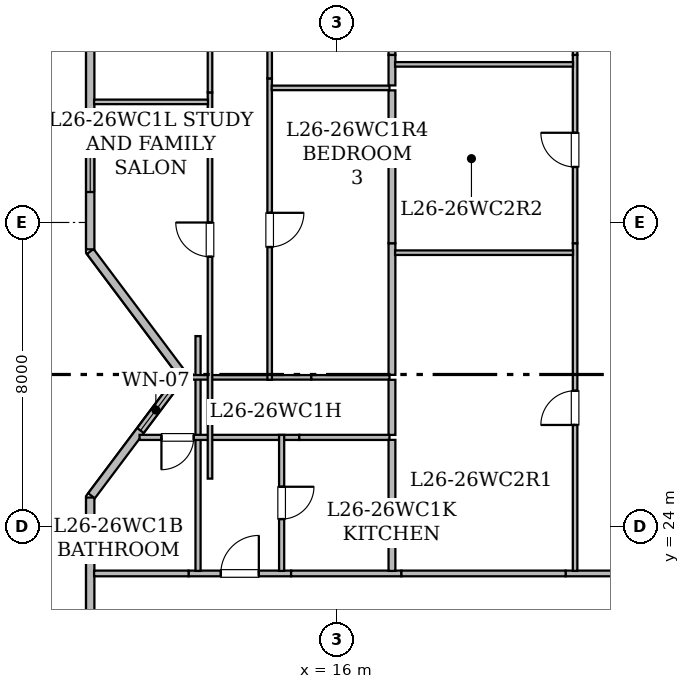
"""IFC4 building model, lengths in metres.
Left out: names, types, materials, properties, quantities, classifications, styles, units other than length and angle.
Written with IfcOpenShell. Run it as: python <this file> out.ifc"""

import sys

from ifc_helpers import new_model, si_unit, direction, frame, frame_2d, origin, place, context, subcontext, project, spatial, rectangle, extrude, element, fill, save


model = new_model("IFC4")
c1 = context("Model", 3, precision=1e-05, world=origin(), true_north=direction((0.0, 1.0)))
c2 = subcontext(c1, "Body", "Model", "MODEL_VIEW")
j1 = project(units=[si_unit("LENGTHUNIT", "METRE"), si_unit("PLANEANGLEUNIT", "RADIAN")], contexts=[c1])
p1 = place(None, origin())
s1 = spatial("IfcSite", under=j1, at=p1, CompositionType="ELEMENT")
p2 = place(p1, origin())
s2 = spatial("IfcBuilding", under=s1, at=p2, CompositionType="ELEMENT")
p3 = place(p2, frame((0.0, 0.0, 105.55)))
s3 = spatial("IfcBuildingStorey", under=s2, at=p3, CompositionType="ELEMENT", Elevation=105.55)
p4 = place(p3, frame((9.51, 10.717, 0.0), z_axis=(0.0, 0.0, 1.0), x_axis=(0.0, 1.0, 0.0)))
e1 = element("IfcWall", 1, at=p4, inside=s3, PredefinedType="STANDARD", context=c2, shape_type="SweptSolid", body=[
    extrude(rectangle(XDim=14.046, YDim=0.22, at=frame_2d((7.023, 0.0))), origin(), (0.0, 0.0, 1.0), 3.43),
])
p5 = place(p4, frame((5.744, 0.0, 0.8)))
e2 = element("IfcOpeningElement", 2, at=p5, cuts=e1, PredefinedType="OPENING", context=c2, shape_type="SweptSolid", body=[
    extrude(rectangle(XDim=1.2, YDim=1.5, at=frame_2d((0.6, 0.75))), frame((0.0, 0.12, 0.0), z_axis=(0.0, -1.0, 0.0), x_axis=(1.0, 0.0, 0.0)), (0.0, 0.0, 1.0), 0.24),
])
p6 = place(p4, frame((2.345, 0.0, 0.85)))
e3 = element("IfcOpeningElement", 3, at=p6, cuts=e1, PredefinedType="OPENING", context=c2, shape_type="SweptSolid", body=[
    extrude(rectangle(XDim=1.65, YDim=1.55, at=frame_2d((0.825, 0.775))), frame((0.0, 0.12, 0.0), z_axis=(0.0, -1.0, 0.0), x_axis=(1.0, 0.0, 0.0)), (0.0, 0.0, 1.0), 0.24),
])
p7 = place(p3, frame((9.544, 24.808, 0.0), z_axis=(0.0, 0.0, 1.0), x_axis=(0.600019580308, 0.799985314394, 0.0)))
e4 = element("IfcWall", 4, at=p7, inside=s3, PredefinedType="STANDARD", context=c2, shape_type="SweptSolid", body=[
    extrude(rectangle(XDim=3.99, YDim=0.22, at=frame_2d((1.995, 0.0))), origin(), (0.0, 0.0, 1.0), 3.43),
])
p8 = place(p7, frame((2.147, 0.0, 0.85)))
e5 = element("IfcOpeningElement", 5, at=p8, cuts=e4, PredefinedType="OPENING", context=c2, shape_type="SweptSolid", body=[
    extrude(rectangle(XDim=1.35, YDim=1.5, at=frame_2d((0.675, 0.75))), frame((0.0, 0.12, 0.0), z_axis=(0.0, -1.0, 0.0), x_axis=(1.0, 0.0, 0.0)), (0.0, 0.0, 1.0), 0.24),
])
p9 = place(p3, frame((11.881, 28.077, 0.0), z_axis=(0.0, 0.0, 1.0), x_axis=(-0.600158184825, 0.799881336942, 0.0)))
e6 = element("IfcWall", 6, at=p9, inside=s3, PredefinedType="STANDARD", context=c2, shape_type="SweptSolid", body=[
    extrude(rectangle(XDim=3.951, YDim=0.22, at=frame_2d((1.975, 0.0))), origin(), (0.0, 0.0, 1.0), 3.43),
])
p10 = place(p3, frame((9.51, 31.293, 0.0), z_axis=(0.0, 0.0, 1.0), x_axis=(0.0, 1.0, 0.0)))
e7 = element("IfcWall", 7, at=p10, inside=s3, PredefinedType="STANDARD", context=c2, shape_type="SweptSolid", body=[
    extrude(rectangle(XDim=14.061, YDim=0.22, at=frame_2d((7.031, 0.0))), origin(), (0.0, 0.0, 1.0), 3.43),
])
p11 = place(p10, frame((1.508, 0.0, 0.85)))
e8 = element("IfcOpeningElement", 8, at=p11, cuts=e7, PredefinedType="OPENING", context=c2, shape_type="SweptSolid", body=[
    extrude(rectangle(XDim=1.65, YDim=1.55, at=frame_2d((0.825, 0.775))), frame((0.0, 0.12, 0.0), z_axis=(0.0, -1.0, 0.0), x_axis=(1.0, 0.0, 0.0)), (0.0, 0.0, 1.0), 0.24),
])
p12 = place(p10, frame((7.195, 0.0, 0.85)))
e9 = element("IfcOpeningElement", 9, at=p12, cuts=e7, PredefinedType="OPENING", context=c2, shape_type="SweptSolid", body=[
    extrude(rectangle(XDim=1.65, YDim=1.55, at=frame_2d((0.825, 0.775))), frame((0.0, 0.12, 0.0), z_axis=(0.0, -1.0, 0.0), x_axis=(1.0, 0.0, 0.0)), (0.0, 0.0, 1.0), 0.24),
])
p13 = place(p10, frame((12.543, 0.0, 0.85)))
e10 = element("IfcOpeningElement", 10, at=p13, cuts=e7, PredefinedType="OPENING", context=c2, shape_type="SweptSolid", body=[
    extrude(rectangle(XDim=1.35, YDim=1.5, at=frame_2d((0.675, 0.75))), frame((0.0, 0.12, 0.0), z_axis=(0.0, -1.0, 0.0), x_axis=(1.0, 0.0, 0.0)), (0.0, 0.0, 1.0), 0.24),
])
p14 = place(p3, frame((12.098, 22.765, 0.0), z_axis=(0.0, 0.0, 1.0), x_axis=(1.0, 0.0, 0.0)))
e11 = element("IfcWall", 11, at=p14, inside=s3, PredefinedType="STANDARD", context=c2, shape_type="SweptSolid", body=[
    extrude(rectangle(XDim=2.698, YDim=0.15, at=frame_2d((1.349, 0.0))), origin(), (0.0, 0.0, 1.0), 2.876),
])
p15 = place(p14, frame((0.849, 0.0, 0.0)))
e12 = element("IfcOpeningElement", 12, at=p15, cuts=e11, PredefinedType="OPENING", context=c2, shape_type="SweptSolid", body=[
    extrude(rectangle(XDim=1.0, YDim=2.15, at=frame_2d((0.5, 1.075))), frame((0.0, 0.085, 0.0), z_axis=(0.0, -1.0, 0.0), x_axis=(1.0, 0.0, 0.0)), (0.0, 0.0, 1.0), 0.17),
])
p16 = place(p3, frame((9.612, 22.765, 0.0), z_axis=(0.0, 0.0, 1.0), x_axis=(1.0, 0.0, 0.0)))
e13 = element("IfcWall", 13, at=p16, inside=s3, PredefinedType="STANDARD", context=c2, shape_type="SweptSolid", body=[
    extrude(rectangle(XDim=2.486, YDim=0.15, at=frame_2d((1.243, 0.0))), origin(), (0.0, 0.0, 1.0), 2.876),
])
p17 = place(p3, frame((14.796, 22.765, 0.0), z_axis=(0.0, 0.0, 1.0), x_axis=(1.0, 0.0, 0.0)))
e14 = element("IfcWall", 14, at=p17, inside=s3, PredefinedType="STANDARD", context=c2, shape_type="SweptSolid", body=[
    extrude(rectangle(XDim=2.903, YDim=0.15, at=frame_2d((1.452, 0.0))), origin(), (0.0, 0.0, 1.0), 3.43),
])
p18 = place(p3, frame((22.02, 22.765, 0.0), z_axis=(0.0, 0.0, 1.0), x_axis=(1.0, 0.0, 0.0)))
e15 = element("IfcWall", 15, at=p18, inside=s3, PredefinedType="STANDARD", context=c2, shape_type="SweptSolid", body=[
    extrude(rectangle(XDim=2.078, YDim=0.15, at=frame_2d((1.039, 0.0))), origin(), (0.0, 0.0, 1.0), 3.43),
])
p19 = place(p3, frame((17.699, 22.765, 0.0), z_axis=(0.0, 0.0, 1.0), x_axis=(1.0, 0.0, 0.0)))
e16 = element("IfcWall", 16, at=p19, inside=s3, PredefinedType="STANDARD", context=c2, shape_type="SweptSolid", body=[
    extrude(rectangle(XDim=4.321, YDim=0.15, at=frame_2d((2.161, 0.0))), origin(), (0.0, 0.0, 1.0), 2.647),
])
p20 = place(p3, frame((12.347, 22.832, 0.0), z_axis=(0.0, 0.0, 1.0), x_axis=(0.0, 1.0, 0.0)))
e17 = element("IfcWall", 17, at=p20, inside=s3, PredefinedType="PARTITIONING", context=c2, shape_type="SweptSolid", body=[
    extrude(rectangle(XDim=6.178, YDim=0.135, at=frame_2d((3.089, 0.0))), origin(), (0.0, 0.0, 1.0), 2.876),
])
p21 = place(p3, frame((15.012, 26.345, 0.0), z_axis=(0.0, 0.0, 1.0), x_axis=(-1.0, 0.0, 0.0)))
e18 = element("IfcWall", 18, at=p21, inside=s3, PredefinedType="PARTITIONING", context=c2, shape_type="SweptSolid", body=[
    extrude(rectangle(XDim=4.204, YDim=0.135, at=frame_2d((2.102, 0.0))), origin(), (0.0, 0.0, 1.0), 2.876),
])
p22 = place(p21, frame((2.778, 0.0, 0.0)))
e19 = element("IfcOpeningElement", 19, at=p22, cuts=e18, PredefinedType="OPENING", context=c2, shape_type="SweptSolid", body=[
    extrude(rectangle(XDim=0.85, YDim=2.1, at=frame_2d((0.425, 1.05))), frame((0.0, 0.077, 0.0), z_axis=(0.0, -1.0, 0.0), x_axis=(1.0, 0.0, 0.0)), (0.0, 0.0, 1.0), 0.155),
])
p23 = place(p3, frame((17.385, 26.345, 0.0), z_axis=(0.0, 0.0, 1.0), x_axis=(-1.0, 0.0, 0.0)))
e20 = element("IfcWall", 20, at=p23, inside=s3, PredefinedType="PARTITIONING", context=c2, shape_type="SweptSolid", body=[
    extrude(rectangle(XDim=2.373, YDim=0.135, at=frame_2d((1.187, 0.0))), origin(), (0.0, 0.0, 1.0), 3.43),
])
p24 = place(p3, frame((14.547, 26.41, 0.0), z_axis=(0.0, 0.0, 1.0), x_axis=(0.0, -1.0, 0.0)))
e21 = element("IfcWall", 21, at=p24, inside=s3, PredefinedType="PARTITIONING", context=c2, shape_type="SweptSolid", body=[
    extrude(rectangle(XDim=3.578, YDim=0.135, at=frame_2d((1.789, 0.0))), origin(), (0.0, 0.0, 1.0), 3.43),
])
p25 = place(p24, frame((1.364, 0.0, 0.0)))
e22 = element("IfcOpeningElement", 22, at=p25, cuts=e21, PredefinedType="OPENING", context=c2, shape_type="SweptSolid", body=[
    extrude(rectangle(XDim=0.85, YDim=2.1, at=frame_2d((0.425, 1.05))), frame((0.0, 0.077, 0.0), z_axis=(0.0, -1.0, 0.0), x_axis=(1.0, 0.0, 0.0)), (0.0, 0.0, 1.0), 0.155),
])
p26 = place(p3, frame((11.894, 27.925, 0.0), z_axis=(0.0, 0.0, 1.0), x_axis=(1.0, 0.0, 0.0)))
e23 = element("IfcWall", 23, at=p26, inside=s3, PredefinedType="PARTITIONING", context=c2, shape_type="SweptSolid", body=[
    extrude(rectangle(XDim=3.433, YDim=0.12, at=frame_2d((1.716, 0.0))), origin(), (0.0, 0.0, 1.0), 2.876),
])
p27 = place(p3, frame((12.662, 25.26, 0.0), z_axis=(0.0, 0.0, 1.0), x_axis=(0.0, 1.0, 0.0)))
e24 = element("IfcWall", 24, at=p27, inside=s3, PredefinedType="PARTITIONING", context=c2, shape_type="SweptSolid", body=[
    extrude(rectangle(XDim=10.162, YDim=0.12, at=frame_2d((5.081, 0.0))), origin(), (0.0, 0.0, 1.0), 3.43),
])
p28 = place(p27, frame((5.839, 0.0, 0.0)))
e25 = element("IfcOpeningElement", 25, at=p28, cuts=e24, PredefinedType="OPENING", context=c2, shape_type="SweptSolid", body=[
    extrude(rectangle(XDim=0.9, YDim=2.1, at=frame_2d((0.45, 1.05))), frame((0.0, 0.07, 0.0), z_axis=(0.0, -1.0, 0.0), x_axis=(1.0, 0.0, 0.0)), (0.0, 0.0, 1.0), 0.14),
])
p29 = place(p3, frame((12.662, 35.422, 0.0), z_axis=(0.0, 0.0, 1.0), x_axis=(0.0, 1.0, 0.0)))
e26 = element("IfcWall", 26, at=p29, inside=s3, PredefinedType="PARTITIONING", context=c2, shape_type="SweptSolid", body=[
    extrude(rectangle(XDim=8.281, YDim=0.12, at=frame_2d((4.14, 0.0))), origin(), (0.0, 0.0, 1.0), 2.647),
])
p30 = place(p29, frame((3.67, 0.0, 0.0)))
e27 = element("IfcOpeningElement", 27, at=p30, cuts=e26, PredefinedType="OPENING", context=c2, shape_type="SweptSolid", body=[
    extrude(rectangle(XDim=0.9, YDim=2.1, at=frame_2d((0.45, 1.05))), frame((0.0, 0.07, 0.0), z_axis=(0.0, -1.0, 0.0), x_axis=(1.0, 0.0, 0.0)), (0.0, 0.0, 1.0), 0.14),
])
p31 = place(p3, frame((15.327, 27.925, 0.0), z_axis=(0.0, 0.0, 1.0), x_axis=(1.0, 0.0, 0.0)))
e28 = element("IfcWall", 28, at=p31, inside=s3, PredefinedType="PARTITIONING", context=c2, shape_type="SweptSolid", body=[
    extrude(rectangle(XDim=2.058, YDim=0.12, at=frame_2d((1.029, 0.0))), origin(), (0.0, 0.0, 1.0), 3.43),
])
p32 = place(p3, frame((14.232, 35.79, 0.0), z_axis=(0.0, 0.0, 1.0), x_axis=(0.0, -1.0, 0.0)))
e29 = element("IfcWall", 29, at=p32, inside=s3, PredefinedType="PARTITIONING", context=c2, shape_type="SweptSolid", body=[
    extrude(rectangle(XDim=7.93, YDim=0.12, at=frame_2d((3.965, 0.0))), origin(), (0.0, 0.0, 1.0), 3.43),
])
p33 = place(p32, frame((3.536, 0.0, 0.0)))
e30 = element("IfcOpeningElement", 30, at=p33, cuts=e29, PredefinedType="OPENING", context=c2, shape_type="SweptSolid", body=[
    extrude(rectangle(XDim=0.9, YDim=2.1, at=frame_2d((0.45, 1.05))), frame((0.0, 0.07, 0.0), z_axis=(0.0, -1.0, 0.0), x_axis=(1.0, 0.0, 0.0)), (0.0, 0.0, 1.0), 0.14),
])
p34 = place(p3, frame((14.232, 44.495, 0.0), z_axis=(0.0, 0.0, 1.0), x_axis=(0.0, -1.0, 0.0)))
e31 = element("IfcWall", 31, at=p34, inside=s3, PredefinedType="PARTITIONING", context=c2, shape_type="SweptSolid", body=[
    extrude(rectangle(XDim=8.705, YDim=0.12, at=frame_2d((4.353, 0.0))), origin(), (0.0, 0.0, 1.0), 2.647),
])
p35 = place(p34, frame((3.923, 0.0, 0.0)))
e32 = element("IfcOpeningElement", 32, at=p35, cuts=e31, PredefinedType="OPENING", context=c2, shape_type="SweptSolid", body=[
    extrude(rectangle(XDim=0.9, YDim=2.1, at=frame_2d((0.45, 1.05))), frame((0.0, 0.07, 0.0), z_axis=(0.0, -1.0, 0.0), x_axis=(1.0, 0.0, 0.0)), (0.0, 0.0, 1.0), 0.14),
])
p36 = place(p3, frame((17.45, 27.86, 0.0), z_axis=(0.0, 0.0, 1.0), x_axis=(0.0, -1.0, 0.0)))
e33 = element("IfcWall", 33, at=p36, inside=s3, PredefinedType="STANDARD", context=c2, shape_type="SweptSolid", body=[
    extrude(rectangle(XDim=1.45, YDim=0.18, at=frame_2d((0.725, 0.0))), origin(), (0.0, 0.0, 1.0), 3.43),
])
p37 = place(p3, frame((17.45, 26.28, 0.0), z_axis=(0.0, 0.0, 1.0), x_axis=(0.0, -1.0, 0.0)))
e34 = element("IfcWall", 34, at=p37, inside=s3, PredefinedType="STANDARD", context=c2, shape_type="SweptSolid", body=[
    extrude(rectangle(XDim=3.448, YDim=0.18, at=frame_2d((1.724, 0.0))), origin(), (0.0, 0.0, 1.0), 3.43),
])
p38 = place(p3, frame((9.612, 35.173, 0.0), z_axis=(0.0, 0.0, 1.0), x_axis=(1.0, 0.0, 0.0)))
e35 = element("IfcWall", 35, at=p38, inside=s3, PredefinedType="PARTITIONING", context=c2, shape_type="SweptSolid", body=[
    extrude(rectangle(XDim=2.996, YDim=0.12, at=frame_2d((1.498, 0.0))), origin(), (0.0, 0.0, 1.0), 2.876),
])
p39 = place(p3, frame((14.286, 35.541, 0.0), z_axis=(0.0, 0.0, 1.0), x_axis=(1.0, 0.0, 0.0)))
e36 = element("IfcWall", 36, at=p39, inside=s3, PredefinedType="PARTITIONING", context=c2, shape_type="SweptSolid", body=[
    extrude(rectangle(XDim=3.099, YDim=0.12, at=frame_2d((1.55, 0.0))), origin(), (0.0, 0.0, 1.0), 3.43),
])
p40 = place(p3, frame((17.45, 31.454, 0.0), z_axis=(0.0, 0.0, 1.0), x_axis=(0.0, -1.0, 0.0)))
e37 = element("IfcWall", 37, at=p40, inside=s3, PredefinedType="STANDARD", context=c2, shape_type="SweptSolid", body=[
    extrude(rectangle(XDim=3.464, YDim=0.18, at=frame_2d((1.732, 0.0))), origin(), (0.0, 0.0, 1.0), 3.43),
])
p41 = place(p3, frame((17.45, 35.476, 0.0), z_axis=(0.0, 0.0, 1.0), x_axis=(0.0, -1.0, 0.0)))
e38 = element("IfcWall", 38, at=p41, inside=s3, PredefinedType="STANDARD", context=c2, shape_type="SweptSolid", body=[
    extrude(rectangle(XDim=4.022, YDim=0.18, at=frame_2d((2.011, 0.0))), origin(), (0.0, 0.0, 1.0), 3.43),
])
p42 = place(p3, frame((17.45, 36.409, 0.0), z_axis=(0.0, 0.0, 1.0), x_axis=(0.0, -1.0, 0.0)))
e39 = element("IfcWall", 39, at=p42, inside=s3, PredefinedType="STANDARD", context=c2, shape_type="SweptSolid", body=[
    extrude(rectangle(XDim=0.803, YDim=0.18, at=frame_2d((0.401, 0.0))), origin(), (0.0, 0.0, 1.0), 3.43),
])
p43 = place(p3, frame((17.45, 42.504, 0.0), z_axis=(0.0, 0.0, 1.0), x_axis=(0.0, -1.0, 0.0)))
e40 = element("IfcWall", 40, at=p43, inside=s3, PredefinedType="STANDARD", context=c2, shape_type="SweptSolid", body=[
    extrude(rectangle(XDim=6.095, YDim=0.18, at=frame_2d((3.047, 0.0))), origin(), (0.0, 0.0, 1.0), 2.647),
])
p44 = place(p3, frame((22.269, 22.832, 0.0), z_axis=(0.0, 0.0, 1.0), x_axis=(0.0, 1.0, 0.0)))
e41 = element("IfcWall", 41, at=p44, inside=s3, PredefinedType="PARTITIONING", context=c2, shape_type="SweptSolid", body=[
    extrude(rectangle(XDim=8.622, YDim=0.12, at=frame_2d((4.311, 0.0))), origin(), (0.0, 0.0, 1.0), 2.961),
])
p45 = place(p44, frame((3.84, 0.0, 0.0)))
e42 = element("IfcOpeningElement", 42, at=p45, cuts=e41, PredefinedType="OPENING", context=c2, shape_type="SweptSolid", body=[
    extrude(rectangle(XDim=0.9, YDim=2.1, at=frame_2d((0.45, 1.05))), frame((0.0, 0.07, 0.0), z_axis=(0.0, -1.0, 0.0), x_axis=(1.0, 0.0, 0.0)), (0.0, 0.0, 1.0), 0.14),
])
p46 = place(p3, frame((22.269, 31.454, 0.0), z_axis=(0.0, 0.0, 1.0), x_axis=(0.0, 1.0, 0.0)))
e43 = element("IfcWall", 43, at=p46, inside=s3, PredefinedType="PARTITIONING", context=c2, shape_type="SweptSolid", body=[
    extrude(rectangle(XDim=4.955, YDim=0.12, at=frame_2d((2.478, 0.0))), origin(), (0.0, 0.0, 1.0), 3.43),
])
p47 = place(p46, frame((2.006, 0.0, 0.0)))
e44 = element("IfcOpeningElement", 44, at=p47, cuts=e43, PredefinedType="OPENING", context=c2, shape_type="SweptSolid", body=[
    extrude(rectangle(XDim=0.9, YDim=2.1, at=frame_2d((0.45, 1.05))), frame((0.0, 0.07, 0.0), z_axis=(0.0, -1.0, 0.0), x_axis=(1.0, 0.0, 0.0)), (0.0, 0.0, 1.0), 0.14),
])
p48 = place(p3, frame((22.269, 36.409, 0.0), z_axis=(0.0, 0.0, 1.0), x_axis=(0.0, 1.0, 0.0)))
e45 = element("IfcWall", 45, at=p48, inside=s3, PredefinedType="PARTITIONING", context=c2, shape_type="SweptSolid", body=[
    extrude(rectangle(XDim=6.095, YDim=0.12, at=frame_2d((3.047, 0.0))), origin(), (0.0, 0.0, 1.0), 2.647),
])
p49 = place(p48, frame((2.576, 0.0, 0.0)))
e46 = element("IfcOpeningElement", 46, at=p49, cuts=e45, PredefinedType="OPENING", context=c2, shape_type="SweptSolid", body=[
    extrude(rectangle(XDim=0.9, YDim=2.1, at=frame_2d((0.45, 1.05))), frame((0.0, 0.07, 0.0), z_axis=(0.0, -1.0, 0.0), x_axis=(1.0, 0.0, 0.0)), (0.0, 0.0, 1.0), 0.14),
])
for number, where, z_axis, x_axis in (
    (47, (17.532, 31.205, 0.0), (0.0, 0.0, 1.0), (1.0, 0.0, 0.0)),
    (48, (17.532, 36.16, 0.0), (0.0, 0.0, 1.0), (1.0, 0.0, 0.0)),
):
    element("IfcWall", number, at=place(p3, frame(where, z_axis=z_axis, x_axis=x_axis)), inside=s3, PredefinedType="PARTITIONING", context=c2, shape_type="SweptSolid", body=[
        extrude(rectangle(XDim=4.683, YDim=0.12, at=frame_2d((2.342, 0.0))), origin(), (0.0, 0.0, 1.0), 2.647),
    ])
p50 = place(p8, origin())
e49 = element("IfcWindow", 49, at=p50, inside=s3, PartitioningType="SINGLE_PANEL", PredefinedType="WINDOW", context=c2, shape_type="SweptSolid", body=[
    extrude(rectangle(XDim=1.35, YDim=1.5, at=frame_2d((0.675, 0.75))), frame((0.0, 0.03, 0.0), z_axis=(0.0, -1.0, 0.0), x_axis=(1.0, 0.0, 0.0)), (0.0, 0.0, 1.0), 0.06),
])
fill(e5, e49)
p51 = place(p11, origin())
e50 = element("IfcWindow", 50, at=p51, inside=s3, PartitioningType="SINGLE_PANEL", PredefinedType="WINDOW", context=c2, shape_type="SweptSolid", body=[
    extrude(rectangle(XDim=1.65, YDim=1.55, at=frame_2d((0.825, 0.775))), frame((0.0, 0.03, 0.0), z_axis=(0.0, -1.0, 0.0), x_axis=(1.0, 0.0, 0.0)), (0.0, 0.0, 1.0), 0.06),
])
fill(e8, e50)
p52 = place(p15, origin())
e51 = element("IfcDoor", 51, at=p52, inside=s3, OperationType="SINGLE_SWING_RIGHT", PredefinedType="DOOR", context=c2, shape_type="SweptSolid", body=[
    extrude(rectangle(XDim=1.0, YDim=2.15, at=frame_2d((0.5, 1.075))), frame((0.0, 0.025, 0.0), z_axis=(0.0, -1.0, 0.0), x_axis=(1.0, 0.0, 0.0)), (0.0, 0.0, 1.0), 0.05),
])
fill(e12, e51)
p53 = place(p22, origin())
e52 = element("IfcDoor", 52, at=p53, inside=s3, OperationType="SINGLE_SWING_RIGHT", PredefinedType="DOOR", context=c2, shape_type="SweptSolid", body=[
    extrude(rectangle(XDim=0.85, YDim=2.1, at=frame_2d((0.425, 1.05))), frame((0.0, 0.025, 0.0), z_axis=(0.0, -1.0, 0.0), x_axis=(1.0, 0.0, 0.0)), (0.0, 0.0, 1.0), 0.05),
])
fill(e19, e52)
p54 = place(p25, origin())
e53 = element("IfcDoor", 53, at=p54, inside=s3, OperationType="SINGLE_SWING_LEFT", PredefinedType="DOOR", context=c2, shape_type="SweptSolid", body=[
    extrude(rectangle(XDim=0.85, YDim=2.1, at=frame_2d((0.425, 1.05))), frame((0.0, 0.025, 0.0), z_axis=(0.0, -1.0, 0.0), x_axis=(1.0, 0.0, 0.0)), (0.0, 0.0, 1.0), 0.05),
])
fill(e22, e53)
p55 = place(p28, origin())
e54 = element("IfcDoor", 54, at=p55, inside=s3, OperationType="SINGLE_SWING_RIGHT", PredefinedType="DOOR", context=c2, shape_type="SweptSolid", body=[
    extrude(rectangle(XDim=0.9, YDim=2.1, at=frame_2d((0.45, 1.05))), frame((0.0, 0.025, 0.0), z_axis=(0.0, -1.0, 0.0), x_axis=(1.0, 0.0, 0.0)), (0.0, 0.0, 1.0), 0.05),
])
fill(e25, e54)
p56 = place(p33, origin())
e55 = element("IfcDoor", 55, at=p56, inside=s3, OperationType="SINGLE_SWING_LEFT", PredefinedType="DOOR", context=c2, shape_type="SweptSolid", body=[
    extrude(rectangle(XDim=0.9, YDim=2.1, at=frame_2d((0.45, 1.05))), frame((0.0, 0.025, 0.0), z_axis=(0.0, -1.0, 0.0), x_axis=(1.0, 0.0, 0.0)), (0.0, 0.0, 1.0), 0.05),
])
fill(e30, e55)
p57 = place(p45, origin())
e56 = element("IfcDoor", 56, at=p57, inside=s3, OperationType="SINGLE_SWING_LEFT", PredefinedType="DOOR", context=c2, shape_type="SweptSolid", body=[
    extrude(rectangle(XDim=0.9, YDim=2.1, at=frame_2d((0.45, 1.05))), frame((0.0, 0.025, 0.0), z_axis=(0.0, -1.0, 0.0), x_axis=(1.0, 0.0, 0.0)), (0.0, 0.0, 1.0), 0.05),
])
fill(e42, e56)
p58 = place(p47, origin())
e57 = element("IfcDoor", 57, at=p58, inside=s3, OperationType="SINGLE_SWING_RIGHT", PredefinedType="DOOR", context=c2, shape_type="SweptSolid", body=[
    extrude(rectangle(XDim=0.9, YDim=2.1, at=frame_2d((0.45, 1.05))), frame((0.0, 0.025, 0.0), z_axis=(0.0, -1.0, 0.0), x_axis=(1.0, 0.0, 0.0)), (0.0, 0.0, 1.0), 0.05),
])
fill(e44, e57)
save(model, sys.argv[1])
